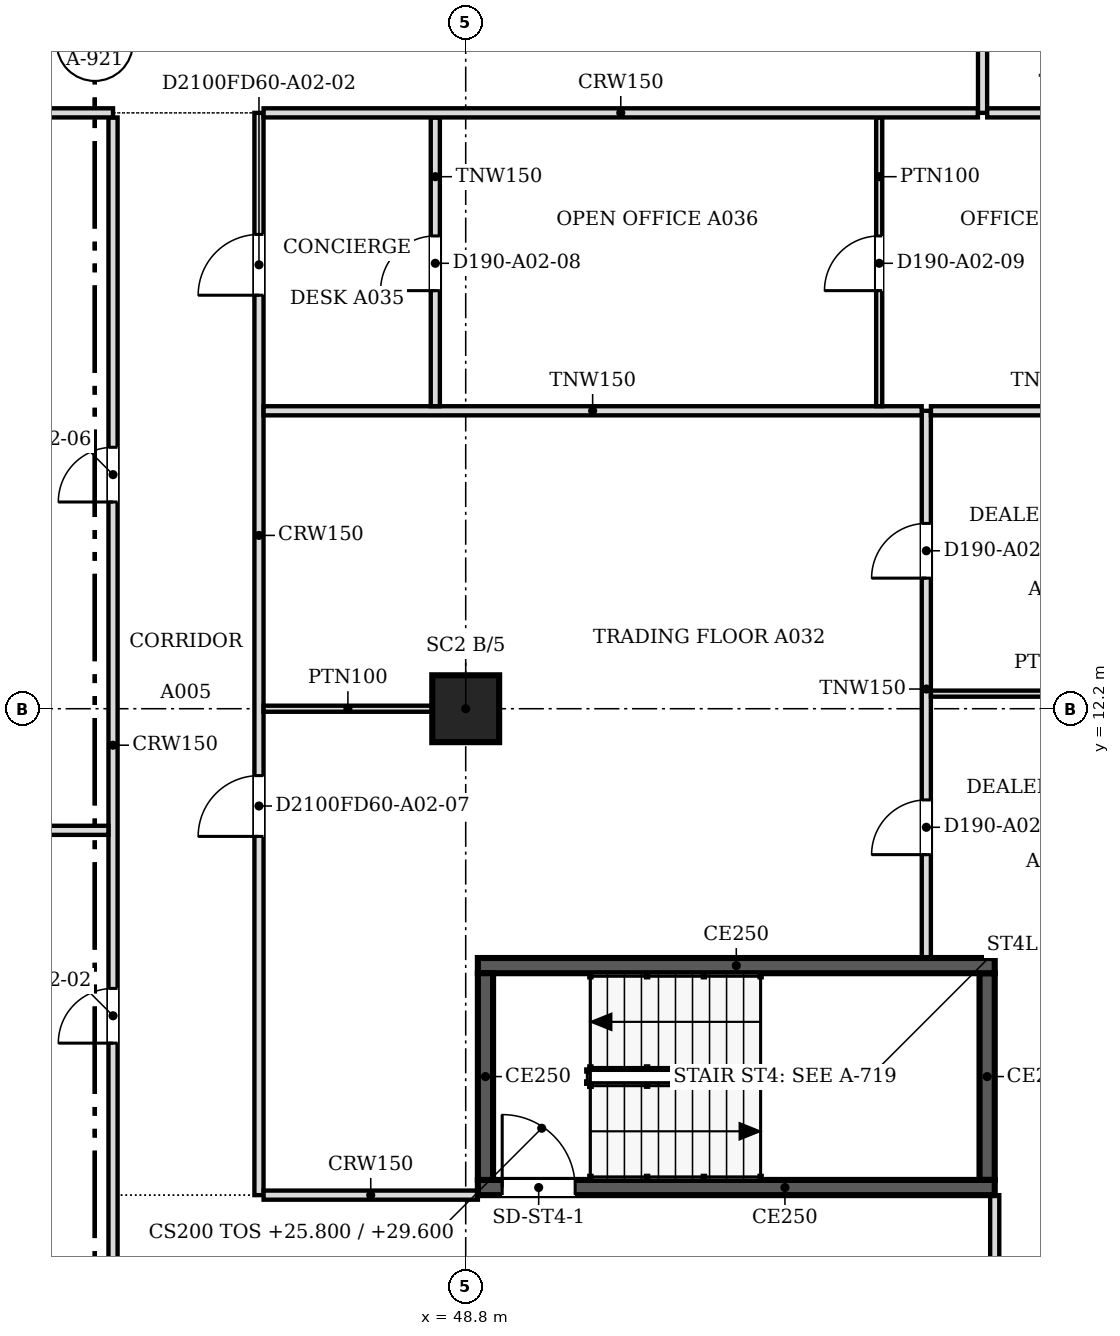
"""IFC4 building model, lengths in metres.
Left out: names, types, materials, properties, quantities, classifications, styles, units other than length and angle.
Written with IfcOpenShell. Run it as: python <this file> out.ifc"""

import sys

from ifc_helpers import new_model, si_unit, direction, frame, frame_2d, origin, origin_2d, place, context, subcontext, project, spatial, polyline, rectangle, outline, extrude, faceted_brep, source, transform, mapped, element, fill, save


model = new_model("IFC4")
c1 = context("Model", 3, precision=1e-05, world=origin(), true_north=direction((0.0, 1.0)))
c2 = subcontext(c1, "Body", "Model", "MODEL_VIEW")
j1 = project(units=[si_unit("LENGTHUNIT", "METRE"), si_unit("PLANEANGLEUNIT", "RADIAN")], contexts=[c1])
p1 = place(None, origin())
s1 = spatial("IfcSite", under=j1, at=p1, CompositionType="ELEMENT")
p2 = place(p1, origin())
s2 = spatial("IfcBuilding", under=s1, at=p2, CompositionType="ELEMENT")
p3 = place(p2, frame((0.0, 0.0, 25.8)))
s3 = spatial("IfcBuildingStorey", under=s2, at=p3, CompositionType="ELEMENT", Elevation=25.8)
p4 = place(p3, frame((48.8, 12.2, 0.0), z_axis=(0.0, 0.0, 1.0), x_axis=(1.0, 0.0, 0.0)))
e1 = element("IfcColumn", 1, at=p4, inside=s3, PredefinedType="COLUMN", context=c2, shape_type="SweptSolid", body=[
    extrude(rectangle(XDim=1.1, YDim=1.1, at=origin_2d()), origin(), (0.0, 0.0, 1.0), 3.6),
])
m1 = source(origin(), c2, "Body", "Brep", [
    faceted_brep([(2.997, -0.25, 3.732), (2.944, -0.25, 3.8), (0.0, -0.25, 0.0), (2.997, -0.25, 0.0), (0.053, 0.25, 0.068), (2.891, 0.25, 3.732), (2.891, 0.25, 0.0), (0.053, 0.25, 0.0), (2.944, 0.0, 3.8), (0.0, 0.0, 0.0)], [[[0, 1, 2, 3]], [[4, 5, 6, 7]], [[8, 1, 0]], [[5, 4, 9, 2, 1, 8]], [[7, 6, 3, 2, 9]], [[7, 9, 4]], [[3, 6, 5, 8, 0]]]),
])
p5 = place(p3, frame((57.606, 1.312, 0.0), z_axis=(0.0, 0.0, 1.0), x_axis=(0.707147509625, 0.707066050402, 0.0)))
e2 = element("IfcWall", 2, at=p5, inside=s3, PredefinedType="SOLIDWALL", context=c2, shape_type="MappedRepresentation", body=[
    mapped(m1, transform((0.0, 0.0, 0.0), scale=1.0)),
])
m2 = source(origin(), c2, "Body", "SweptSolid", [
    extrude(outline(polyline([(2.744, 3.134), (0.51, 0.25), (2.744, 0.25), (2.744, 3.134)])), frame((0.0, 0.26, 0.0), z_axis=(0.0, -1.0, 0.0), x_axis=(1.0, 0.0, 0.0)), (0.0, 0.0, 1.0), 0.52),
])
p6 = place(p5, origin())
e3 = element("IfcOpeningElement", 3, at=p6, cuts=e2, PredefinedType="OPENING", context=c2, shape_type="MappedRepresentation", body=[
    mapped(m2, transform((0.0, 0.0, 0.0), scale=1.0)),
])
p7 = place(p2, frame((0.0, 0.0, 29.6)))
s4 = spatial("IfcBuildingStorey", under=s2, at=p7, CompositionType="ELEMENT", Elevation=29.6)
m3 = source(origin(), c2, "Body", "Brep", [
    faceted_brep([(0.053, -0.25, 0.0), (2.997, -0.25, 3.8), (0.053, -0.25, 7.6), (0.0, -0.25, 7.532), (0.0, -0.25, 0.068), (0.106, 0.25, 7.531), (2.944, 0.25, 3.868), (2.944, 0.25, 3.732), (0.106, 0.25, 0.068), (2.997, 0.0, 3.8), (0.053, 0.0, 0.0), (0.053, 0.0, 7.6)], [[[0, 1, 2, 3, 4]], [[5, 6, 7, 8]], [[8, 7, 9, 1, 0, 10]], [[6, 5, 11, 2, 1, 9]], [[3, 2, 11]], [[10, 0, 4]], [[8, 10, 4, 3, 11, 5]], [[7, 6, 9]]]),
])
p8 = place(p7, frame((57.569, 1.274, -3.8), z_axis=(0.0, 0.0, 1.0), x_axis=(0.707066050402, 0.707147509625, 0.0)))
e4 = element("IfcWall", 4, at=p8, inside=s4, PredefinedType="SOLIDWALL", context=c2, shape_type="MappedRepresentation", body=[
    mapped(m3, transform((0.0, 0.0, 0.0), scale=1.0)),
])
m4 = source(origin(), c2, "Body", "SweptSolid", [
    extrude(outline(polyline([(0.253, 0.666), (2.681, 3.8), (0.253, 6.934), (0.253, 0.666)])), frame((0.0, 0.26, 0.0), z_axis=(0.0, -1.0, 0.0), x_axis=(1.0, 0.0, 0.0)), (0.0, 0.0, 1.0), 0.52),
])
p9 = place(p8, origin())
e5 = element("IfcOpeningElement", 5, at=p9, cuts=e4, PredefinedType="OPENING", context=c2, shape_type="MappedRepresentation", body=[
    mapped(m4, transform((0.0, 0.0, 0.0), scale=1.0)),
])
p10 = place(p3, frame((57.5, 4.325, 0.0), z_axis=(0.0, 0.0, 1.0), x_axis=(-1.0, 0.0, 0.0)))
e6 = element("IfcWall", 6, at=p10, inside=s3, PredefinedType="SOLIDWALL", context=c2, shape_type="SweptSolid", body=[
    extrude(rectangle(XDim=8.5, YDim=0.25, at=frame_2d((4.25, 0.0))), origin(), (0.0, 0.0, 1.0), 3.8),
])
m5 = source(origin(), c2, "Body", "SweptSolid", [
    extrude(rectangle(XDim=1.2, YDim=2.1, at=frame_2d((0.6, 1.05))), frame((0.0, 0.135, 0.0), z_axis=(0.0, -1.0, 0.0), x_axis=(1.0, 0.0, 0.0)), (0.0, 0.0, 1.0), 0.27),
])
p11 = place(p10, frame((6.9, 0.0, 0.0)))
e7 = element("IfcOpeningElement", 7, at=p11, cuts=e6, PredefinedType="OPENING", context=c2, shape_type="MappedRepresentation", body=[
    mapped(m5, transform((0.0, 0.0, 0.0), scale=1.0)),
])
p12 = place(p3, frame((49.125, 4.45, 0.0), z_axis=(0.0, 0.0, 1.0), x_axis=(0.0, 1.0, 0.0)))
e8 = element("IfcWall", 8, at=p12, inside=s3, PredefinedType="SOLIDWALL", context=c2, shape_type="SweptSolid", body=[
    extrude(rectangle(XDim=3.4, YDim=0.25, at=frame_2d((1.7, 0.0))), origin(), (0.0, 0.0, 1.0), 3.8),
])
p13 = place(p3, frame((49.0, 7.975, 0.0), z_axis=(0.0, 0.0, 1.0), x_axis=(1.0, 0.0, 0.0)))
e9 = element("IfcWall", 9, at=p13, inside=s3, PredefinedType="SOLIDWALL", context=c2, shape_type="SweptSolid", body=[
    extrude(rectangle(XDim=8.5, YDim=0.25, at=frame_2d((4.25, 0.0))), origin(), (0.0, 0.0, 1.0), 3.8),
])
p14 = place(p3, frame((57.375, 7.85, 0.0), z_axis=(0.0, 0.0, 1.0), x_axis=(0.0, -1.0, 0.0)))
e10 = element("IfcWall", 10, at=p14, inside=s3, PredefinedType="SOLIDWALL", context=c2, shape_type="SweptSolid", body=[
    extrude(rectangle(XDim=3.4, YDim=0.25, at=frame_2d((1.7, 0.0))), origin(), (0.0, 0.0, 1.0), 3.8),
])
p15 = place(p3, frame((43.0, 0.5, 0.0), z_axis=(0.0, 0.0, 1.0), x_axis=(0.0, 1.0, 0.0)))
e11 = element("IfcWall", 11, at=p15, inside=s3, PredefinedType="PARTITIONING", context=c2, shape_type="SweptSolid", body=[
    extrude(rectangle(XDim=21.424, YDim=0.15, at=frame_2d((10.712, 0.0))), origin(), (0.0, 0.0, 1.0), 3.067),
])
m6 = source(origin(), c2, "Body", "SweptSolid", [
    extrude(rectangle(XDim=0.9, YDim=2.1, at=frame_2d((0.45, 1.05))), frame((0.0, 0.085, 0.0), z_axis=(0.0, -1.0, 0.0), x_axis=(1.0, 0.0, 0.0)), (0.0, 0.0, 1.0), 0.17),
])
p16 = place(p15, frame((6.2, 0.0, 0.0)))
e12 = element("IfcOpeningElement", 12, at=p16, cuts=e11, PredefinedType="OPENING", context=c2, shape_type="MappedRepresentation", body=[
    mapped(m6, transform((0.0, 0.0, 0.0), scale=1.0)),
])
p17 = place(p15, frame((15.1, 0.0, 0.0)))
e13 = element("IfcOpeningElement", 13, at=p17, cuts=e11, PredefinedType="OPENING", context=c2, shape_type="MappedRepresentation", body=[
    mapped(m6, transform((0.0, 0.0, 0.0), scale=1.0)),
])
p18 = place(p3, frame((57.5, 1.559, 0.0), z_axis=(0.0, 0.0, 1.0), x_axis=(0.0, 1.0, 0.0)))
e14 = element("IfcWall", 14, at=p18, inside=s3, PredefinedType="PARTITIONING", context=c2, shape_type="SweptSolid", body=[
    extrude(rectangle(XDim=2.641, YDim=0.15, at=frame_2d((1.32, 0.0))), origin(), (0.0, 0.0, 1.0), 3.067),
])
p19 = place(p3, frame((45.4, 22.0, 0.0), z_axis=(0.0, 0.0, 1.0), x_axis=(0.0, -1.0, 0.0)))
e15 = element("IfcWall", 15, at=p19, inside=s3, PredefinedType="PARTITIONING", context=c2, shape_type="SweptSolid", body=[
    extrude(rectangle(XDim=17.8, YDim=0.15, at=frame_2d((8.9, 0.0))), origin(), (0.0, 0.0, 1.0), 3.067),
])
m7 = source(origin(), c2, "Body", "SweptSolid", [
    extrude(rectangle(XDim=1.0, YDim=2.1, at=frame_2d((0.5, 1.05))), frame((0.0, 0.085, 0.0), z_axis=(0.0, -1.0, 0.0), x_axis=(1.0, 0.0, 0.0)), (0.0, 0.0, 1.0), 0.17),
])
p20 = place(p19, frame((1.999, 0.0, 0.0)))
e16 = element("IfcOpeningElement", 16, at=p20, cuts=e15, PredefinedType="OPENING", context=c2, shape_type="MappedRepresentation", body=[
    mapped(m7, transform((0.0, 0.0, 0.0), scale=1.0)),
])
p21 = place(p19, frame((10.9, 0.0, 0.0)))
e17 = element("IfcOpeningElement", 17, at=p21, cuts=e15, PredefinedType="OPENING", context=c2, shape_type="MappedRepresentation", body=[
    mapped(m7, transform((0.0, 0.0, 0.0), scale=1.0)),
])
p22 = place(p3, frame((45.476, 4.2, 0.0), z_axis=(0.0, 0.0, 1.0), x_axis=(1.0, 0.0, 0.0)))
e18 = element("IfcWall", 18, at=p22, inside=s3, PredefinedType="PARTITIONING", context=c2, shape_type="SweptSolid", body=[
    extrude(rectangle(XDim=3.524, YDim=0.15, at=frame_2d((1.762, 0.0))), origin(), (0.0, 0.0, 1.0), 3.067),
])
p23 = place(p3, frame((56.375, 17.1, 0.0), z_axis=(0.0, 0.0, 1.0), x_axis=(0.0, -1.0, 0.0)))
e19 = element("IfcWall", 19, at=p23, inside=s3, PredefinedType="PARTITIONING", context=c2, shape_type="SweptSolid", body=[
    extrude(rectangle(XDim=9.0, YDim=0.15, at=frame_2d((4.5, 0.0))), origin(), (0.0, 0.0, 1.0), 3.067),
])
p24 = place(p23, frame((6.4, 0.0, 0.0)))
e20 = element("IfcOpeningElement", 20, at=p24, cuts=e19, PredefinedType="OPENING", context=c2, shape_type="MappedRepresentation", body=[
    mapped(m6, transform((0.0, 0.0, 0.0), scale=1.0)),
])
p25 = place(p23, frame((1.852, 0.0, 0.0)))
e21 = element("IfcOpeningElement", 21, at=p25, cuts=e19, PredefinedType="OPENING", context=c2, shape_type="MappedRepresentation", body=[
    mapped(m6, transform((0.0, 0.0, 0.0), scale=1.0)),
])
p26 = place(p3, frame((27.075, 10.2, 0.0), z_axis=(0.0, 0.0, 1.0), x_axis=(1.0, 0.0, 0.0)))
e22 = element("IfcWall", 22, at=p26, inside=s3, PredefinedType="PARTITIONING", context=c2, shape_type="SweptSolid", body=[
    extrude(rectangle(XDim=15.849, YDim=0.15, at=frame_2d((7.925, 0.0))), origin(), (0.0, 0.0, 1.0), 3.067),
])
p27 = place(p3, frame((48.25, 12.2, 0.0), z_axis=(0.0, 0.0, 1.0), x_axis=(-1.0, 0.0, 0.0)))
e23 = element("IfcWall", 23, at=p27, inside=s3, PredefinedType="PARTITIONING", context=c2, shape_type="SweptSolid", body=[
    extrude(rectangle(XDim=2.775, YDim=0.1, at=frame_2d((1.387, 0.0))), origin(), (0.0, 0.0, 1.0), 3.067),
])
p28 = place(p3, frame((56.451, 12.448, 0.0), z_axis=(0.0, 0.0, 1.0), x_axis=(1.0, 0.0, 0.0)))
e24 = element("IfcWall", 24, at=p28, inside=s3, PredefinedType="PARTITIONING", context=c2, shape_type="SweptSolid", body=[
    extrude(rectangle(XDim=4.049, YDim=0.1, at=frame_2d((2.024, 0.0))), origin(), (0.0, 0.0, 1.0), 3.067),
])
p29 = place(p3, frame((45.476, 17.1, 0.0), z_axis=(0.0, 0.0, 1.0), x_axis=(1.0, 0.0, 0.0)))
e25 = element("IfcWall", 25, at=p29, inside=s3, PredefinedType="PARTITIONING", context=c2, shape_type="SweptSolid", body=[
    extrude(rectangle(XDim=10.823, YDim=0.15, at=frame_2d((5.412, 0.0))), origin(), (0.0, 0.0, 1.0), 3.067),
])
p30 = place(p3, frame((56.451, 17.1, 0.0), z_axis=(0.0, 0.0, 1.0), x_axis=(1.0, 0.0, 0.0)))
e26 = element("IfcWall", 26, at=p30, inside=s3, PredefinedType="PARTITIONING", context=c2, shape_type="SweptSolid", body=[
    extrude(rectangle(XDim=4.049, YDim=0.15, at=frame_2d((2.024, 0.0))), origin(), (0.0, 0.0, 1.0), 3.067),
])
p31 = place(p3, frame((48.3, 21.924, 0.0), z_axis=(0.0, 0.0, 1.0), x_axis=(0.0, -1.0, 0.0)))
e27 = element("IfcWall", 27, at=p31, inside=s3, PredefinedType="PARTITIONING", context=c2, shape_type="SweptSolid", body=[
    extrude(rectangle(XDim=4.748, YDim=0.15, at=frame_2d((2.374, 0.0))), origin(), (0.0, 0.0, 1.0), 3.067),
])
p32 = place(p31, frame((1.948, 0.0, 0.0)))
e28 = element("IfcOpeningElement", 28, at=p32, cuts=e27, PredefinedType="OPENING", context=c2, shape_type="MappedRepresentation", body=[
    mapped(m6, transform((0.0, 0.0, 0.0), scale=1.0)),
])
p33 = place(p3, frame((55.6, 21.924, 0.0), z_axis=(0.0, 0.0, 1.0), x_axis=(0.0, -1.0, 0.0)))
e29 = element("IfcWall", 29, at=p33, inside=s3, PredefinedType="PARTITIONING", context=c2, shape_type="SweptSolid", body=[
    extrude(rectangle(XDim=4.748, YDim=0.1, at=frame_2d((2.374, 0.0))), origin(), (0.0, 0.0, 1.0), 3.067),
])
m8 = source(origin(), c2, "Body", "SweptSolid", [
    extrude(rectangle(XDim=0.9, YDim=2.1, at=frame_2d((0.45, 1.05))), frame((0.0, 0.06, 0.0), z_axis=(0.0, -1.0, 0.0), x_axis=(1.0, 0.0, 0.0)), (0.0, 0.0, 1.0), 0.12),
])
p34 = place(p33, frame((1.948, 0.0, 0.0)))
e30 = element("IfcOpeningElement", 30, at=p34, cuts=e29, PredefinedType="OPENING", context=c2, shape_type="MappedRepresentation", body=[
    mapped(m8, transform((0.0, 0.0, 0.0), scale=1.0)),
])
p35 = place(p3, frame((30.5, 22.0, 0.0), z_axis=(0.0, 0.0, 1.0), x_axis=(1.0, 0.0, 0.0)))
e31 = element("IfcWall", 31, at=p35, inside=s3, PredefinedType="PARTITIONING", context=c2, shape_type="SweptSolid", body=[
    extrude(rectangle(XDim=12.5, YDim=0.15, at=frame_2d((6.25, 0.0))), origin(), (0.0, 0.0, 1.0), 3.067),
])
p36 = place(p3, frame((45.476, 22.0, 0.0), z_axis=(0.0, 0.0, 1.0), x_axis=(1.0, 0.0, 0.0)))
e32 = element("IfcWall", 32, at=p36, inside=s3, PredefinedType="PARTITIONING", context=c2, shape_type="SweptSolid", body=[
    extrude(rectangle(XDim=11.748, YDim=0.15, at=frame_2d((5.874, 0.0))), origin(), (0.0, 0.0, 1.0), 3.067),
])
p37 = place(p3, frame((57.3, 30.6, 0.0), z_axis=(0.0, 0.0, 1.0), x_axis=(0.0, -1.0, 0.0)))
e33 = element("IfcWall", 33, at=p37, inside=s3, PredefinedType="PARTITIONING", context=c2, shape_type="SweptSolid", body=[
    extrude(rectangle(XDim=8.6, YDim=0.15, at=frame_2d((4.3, 0.0))), origin(), (0.0, 0.0, 1.0), 3.067),
])
p38 = place(p37, frame((3.9, 0.0, 0.0)))
e34 = element("IfcOpeningElement", 34, at=p38, cuts=e33, PredefinedType="OPENING", context=c2, shape_type="MappedRepresentation", body=[
    mapped(m6, transform((0.0, 0.0, 0.0), scale=1.0)),
])
p39 = place(p3, frame((57.376, 22.0, 0.0), z_axis=(0.0, 0.0, 1.0), x_axis=(1.0, 0.0, 0.0)))
e35 = element("IfcWall", 35, at=p39, inside=s3, PredefinedType="PARTITIONING", context=c2, shape_type="SweptSolid", body=[
    extrude(rectangle(XDim=3.124, YDim=0.15, at=frame_2d((1.562, 0.0))), origin(), (0.0, 0.0, 1.0), 3.067),
])
m9 = source(origin(), c2, "Body", "SweptSolid", [
    extrude(rectangle(XDim=1.2, YDim=2.1, at=frame_2d((0.6, 1.05))), frame((0.0, 0.025, 0.0), z_axis=(0.0, -1.0, 0.0), x_axis=(1.0, 0.0, 0.0)), (0.0, 0.0, 1.0), 0.05),
])
p40 = place(p11, origin())
e36 = element("IfcDoor", 36, at=p40, inside=s3, OperationType="SINGLE_SWING_RIGHT", PredefinedType="DOOR", context=c2, shape_type="MappedRepresentation", body=[
    mapped(m9, transform((0.0, 0.0, 0.0), scale=1.0)),
])
fill(e7, e36)
m10 = source(origin(), c2, "Body", "SweptSolid", [
    extrude(rectangle(XDim=0.9, YDim=2.1, at=frame_2d((0.45, 1.05))), frame((0.0, 0.025, 0.0), z_axis=(0.0, -1.0, 0.0), x_axis=(1.0, 0.0, 0.0)), (0.0, 0.0, 1.0), 0.05),
])
p41 = place(p24, origin())
e37 = element("IfcDoor", 37, at=p41, inside=s3, OperationType="SINGLE_SWING_RIGHT", PredefinedType="DOOR", context=c2, shape_type="MappedRepresentation", body=[
    mapped(m10, transform((0.0, 0.0, 0.0), scale=1.0)),
])
fill(e20, e37)
p42 = place(p25, origin())
e38 = element("IfcDoor", 38, at=p42, inside=s3, OperationType="SINGLE_SWING_RIGHT", PredefinedType="DOOR", context=c2, shape_type="MappedRepresentation", body=[
    mapped(m10, transform((0.0, 0.0, 0.0), scale=1.0)),
])
fill(e21, e38)
p43 = place(p32, origin())
e39 = element("IfcDoor", 39, at=p43, inside=s3, OperationType="SINGLE_SWING_RIGHT", PredefinedType="DOOR", context=c2, shape_type="MappedRepresentation", body=[
    mapped(m10, transform((0.0, 0.0, 0.0), scale=1.0)),
])
fill(e28, e39)
p44 = place(p34, origin())
e40 = element("IfcDoor", 40, at=p44, inside=s3, OperationType="SINGLE_SWING_RIGHT", PredefinedType="DOOR", context=c2, shape_type="MappedRepresentation", body=[
    mapped(m10, transform((0.0, 0.0, 0.0), scale=1.0)),
])
fill(e30, e40)
m11 = source(origin(), c2, "Body", "SweptSolid", [
    extrude(rectangle(XDim=1.0, YDim=2.1, at=frame_2d((0.5, 1.05))), frame((0.0, 0.025, 0.0), z_axis=(0.0, -1.0, 0.0), x_axis=(1.0, 0.0, 0.0)), (0.0, 0.0, 1.0), 0.05),
])
p45 = place(p20, origin())
e41 = element("IfcDoor", 41, at=p45, inside=s3, OperationType="SINGLE_SWING_RIGHT", PredefinedType="DOOR", context=c2, shape_type="MappedRepresentation", body=[
    mapped(m11, transform((0.0, 0.0, 0.0), scale=1.0)),
])
fill(e16, e41)
p46 = place(p16, origin())
e42 = element("IfcDoor", 42, at=p46, inside=s3, OperationType="SINGLE_SWING_LEFT", PredefinedType="DOOR", context=c2, shape_type="MappedRepresentation", body=[
    mapped(m10, transform((0.0, 0.0, 0.0), scale=1.0)),
])
fill(e12, e42)
p47 = place(p17, origin())
e43 = element("IfcDoor", 43, at=p47, inside=s3, OperationType="SINGLE_SWING_LEFT", PredefinedType="DOOR", context=c2, shape_type="MappedRepresentation", body=[
    mapped(m10, transform((0.0, 0.0, 0.0), scale=1.0)),
])
fill(e13, e43)
p48 = place(p21, origin())
e44 = element("IfcDoor", 44, at=p48, inside=s3, OperationType="SINGLE_SWING_RIGHT", PredefinedType="DOOR", context=c2, shape_type="MappedRepresentation", body=[
    mapped(m11, transform((0.0, 0.0, 0.0), scale=1.0)),
])
fill(e17, e44)
save(model, sys.argv[1])
